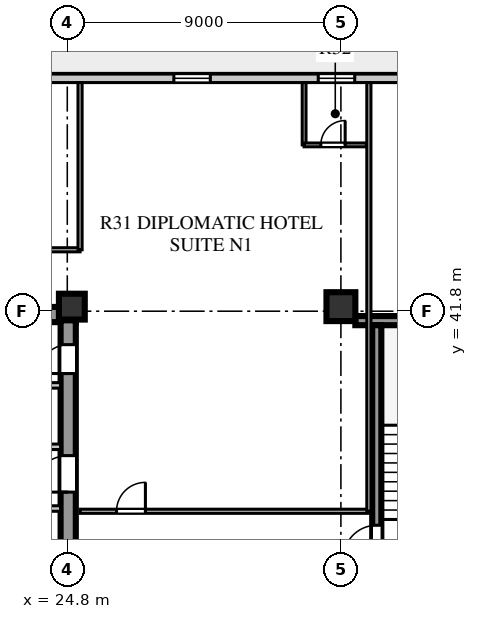
"""IFC4 building model, lengths in metres.
Left out: names, types, materials, properties, quantities, classifications, styles, units other than length and angle.
Written with IfcOpenShell. Run it as: python <this file> out.ifc"""

import sys

from ifc_helpers import new_model, si_unit, direction, frame, frame_2d, origin, origin_2d, place, context, subcontext, project, spatial, rectangle, extrude, element, fill, save


model = new_model("IFC4")
c1 = context("Model", 3, precision=1e-05, world=origin(), true_north=direction((0.0, 1.0)))
c2 = subcontext(c1, "Body", "Model", "MODEL_VIEW")
j1 = project(units=[si_unit("LENGTHUNIT", "METRE"), si_unit("PLANEANGLEUNIT", "RADIAN")], contexts=[c1])
p1 = place(None, origin())
s1 = spatial("IfcSite", under=j1, at=p1, CompositionType="ELEMENT")
p2 = place(p1, origin())
s2 = spatial("IfcBuilding", under=s1, at=p2, CompositionType="ELEMENT")
p3 = place(p2, frame((0.0, 0.0, 188.7)))
s3 = spatial("IfcBuildingStorey", under=s2, at=p3, CompositionType="ELEMENT", Elevation=188.7)
p4 = place(p3, frame((15.4, 41.69, 0.0), z_axis=(0.0, 0.0, 1.0), x_axis=(1.0, 0.0, 0.0)))
e1 = element("IfcWall", 1, at=p4, inside=s3, PredefinedType="SHEAR", context=c2, shape_type="SweptSolid", body=[
    extrude(rectangle(XDim=9.68, YDim=0.5, at=frame_2d((4.84, 0.0))), origin(), (0.0, 0.0, 1.0), 3.6),
])
p5 = place(p3, frame((24.83, 15.74, 0.0), z_axis=(0.0, 0.0, 1.0), x_axis=(0.0, 1.0, 0.0)))
e2 = element("IfcWall", 2, at=p5, inside=s3, PredefinedType="SHEAR", context=c2, shape_type="SweptSolid", body=[
    extrude(rectangle(XDim=25.76, YDim=0.5, at=frame_2d((12.88, 0.0))), origin(), (0.0, 0.0, 1.0), 3.6),
])
p6 = place(p5, frame((1.61, 0.0, 0.0)))
e3 = element("IfcOpeningElement", 3, at=p6, cuts=e2, PredefinedType="OPENING", context=c2, shape_type="SweptSolid", body=[
    extrude(rectangle(XDim=1.2, YDim=2.1, at=frame_2d((0.6, 1.05))), frame((0.0, 0.26, 0.0), z_axis=(0.0, -1.0, 0.0), x_axis=(1.0, 0.0, 0.0)), (0.0, 0.0, 1.0), 0.52),
])
p7 = place(p5, frame((6.78, 0.0, 0.0)))
e4 = element("IfcOpeningElement", 4, at=p7, cuts=e2, PredefinedType="OPENING", context=c2, shape_type="SweptSolid", body=[
    extrude(rectangle(XDim=0.85, YDim=2.06, at=frame_2d((0.425, 1.03))), frame((0.0, 0.26, 0.0), z_axis=(0.0, -1.0, 0.0), x_axis=(1.0, 0.0, 0.0)), (0.0, 0.0, 1.0), 0.52),
])
p8 = place(p5, frame((12.11, 0.0, 0.0)))
e5 = element("IfcOpeningElement", 5, at=p8, cuts=e2, PredefinedType="OPENING", context=c2, shape_type="SweptSolid", body=[
    extrude(rectangle(XDim=1.5, YDim=2.12, at=frame_2d((0.75, 1.06))), frame((0.0, 0.26, 0.0), z_axis=(0.0, -1.0, 0.0), x_axis=(1.0, 0.0, 0.0)), (0.0, 0.0, 1.0), 0.52),
])
p9 = place(p5, frame((20.11, 0.0, 0.0)))
e6 = element("IfcOpeningElement", 6, at=p9, cuts=e2, PredefinedType="OPENING", context=c2, shape_type="SweptSolid", body=[
    extrude(rectangle(XDim=1.2, YDim=2.12, at=frame_2d((0.6, 1.06))), frame((0.0, 0.26, 0.0), z_axis=(0.0, -1.0, 0.0), x_axis=(1.0, 0.0, 0.0)), (0.0, 0.0, 1.0), 0.52),
])
p10 = place(p5, frame((24.01, 0.0, 0.0)))
e7 = element("IfcOpeningElement", 7, at=p10, cuts=e2, PredefinedType="OPENING", context=c2, shape_type="SweptSolid", body=[
    extrude(rectangle(XDim=0.95, YDim=2.1, at=frame_2d((0.475, 1.05))), frame((0.0, 0.26, 0.0), z_axis=(0.0, -1.0, 0.0), x_axis=(1.0, 0.0, 0.0)), (0.0, 0.0, 1.0), 0.52),
])
p11 = place(p3, frame((34.275, 41.49, 0.0), z_axis=(0.0, 0.0, 1.0), x_axis=(1.0, 0.0, 0.0)))
e8 = element("IfcWall", 8, at=p11, inside=s3, PredefinedType="SHEAR", context=c2, shape_type="SweptSolid", body=[
    extrude(rectangle(XDim=4.595, YDim=0.3, at=frame_2d((2.298, 0.0))), origin(), (0.0, 0.0, 1.0), 3.6),
])
p12 = place(p3, frame((34.98, 33.31, 0.0), z_axis=(0.0, 0.0, 1.0), x_axis=(0.0, 1.0, 0.0)))
e9 = element("IfcWall", 9, at=p12, inside=s3, PredefinedType="SHEAR", context=c2, shape_type="SweptSolid", body=[
    extrude(rectangle(XDim=8.03, YDim=0.3, at=frame_2d((4.015, 0.0))), origin(), (0.0, 0.0, 1.0), 3.6),
])
p13 = place(p12, frame((0.35, 0.0, 0.0)))
e10 = element("IfcOpeningElement", 10, at=p13, cuts=e9, PredefinedType="OPENING", context=c2, shape_type="SweptSolid", body=[
    extrude(rectangle(XDim=1.1, YDim=2.1, at=frame_2d((0.55, 1.05))), frame((0.0, 0.16, 0.0), z_axis=(0.0, -1.0, 0.0), x_axis=(1.0, 0.0, 0.0)), (0.0, 0.0, 1.0), 0.32),
])
p14 = place(p3, frame((24.95, 41.95, 0.0), z_axis=(0.0, 0.0, 1.0), x_axis=(1.0, 0.0, 0.0)))
e11 = element("IfcColumn", 11, at=p14, inside=s3, PredefinedType="COLUMN", context=c2, shape_type="SweptSolid", body=[
    extrude(rectangle(XDim=0.85, YDim=0.85, at=origin_2d()), origin(), (0.0, 0.0, 1.0), 3.6),
])
p15 = place(p3, frame((33.8, 41.95, 0.0), z_axis=(0.0, 0.0, 1.0), x_axis=(1.0, 0.0, 0.0)))
e12 = element("IfcColumn", 12, at=p15, inside=s3, PredefinedType="COLUMN", context=c2, shape_type="SweptSolid", body=[
    extrude(rectangle(XDim=0.95, YDim=0.95, at=origin_2d()), origin(), (0.0, 0.0, 1.0), 3.6),
])
p16 = place(p3, frame((45.55, 49.46, 0.0), z_axis=(0.0, 0.0, 1.0), x_axis=(-1.0, 0.0, 0.0)))
e13 = element("IfcWall", 13, at=p16, inside=s3, PredefinedType="STANDARD", context=c2, shape_type="SweptSolid", body=[
    extrude(rectangle(XDim=32.5, YDim=0.28, at=frame_2d((16.25, 0.0))), origin(), (0.0, 0.0, 1.0), 3.6),
])
p17 = place(p16, frame((30.55, 0.0, 0.0)))
e14 = element("IfcOpeningElement", 14, at=p17, cuts=e13, PredefinedType="OPENING", context=c2, shape_type="SweptSolid", body=[
    extrude(rectangle(XDim=1.0, YDim=2.05, at=frame_2d((0.5, 1.025))), frame((0.0, 0.15, 0.0), z_axis=(0.0, -1.0, 0.0), x_axis=(1.0, 0.0, 0.0)), (0.0, 0.0, 1.0), 0.3),
])
p18 = place(p16, frame((24.72, 0.0, 0.8)))
e15 = element("IfcOpeningElement", 15, at=p18, cuts=e13, PredefinedType="OPENING", context=c2, shape_type="SweptSolid", body=[
    extrude(rectangle(XDim=1.5, YDim=2.0, at=frame_2d((0.75, 1.0))), frame((0.0, 0.15, 0.0), z_axis=(0.0, -1.0, 0.0), x_axis=(1.0, 0.0, 0.0)), (0.0, 0.0, 1.0), 0.3),
])
p19 = place(p16, frame((16.045, 0.0, 0.8)))
e16 = element("IfcOpeningElement", 16, at=p19, cuts=e13, PredefinedType="OPENING", context=c2, shape_type="SweptSolid", body=[
    extrude(rectangle(XDim=1.2, YDim=1.75, at=frame_2d((0.6, 0.875))), frame((0.0, 0.15, 0.0), z_axis=(0.0, -1.0, 0.0), x_axis=(1.0, 0.0, 0.0)), (0.0, 0.0, 1.0), 0.3),
])
p20 = place(p16, frame((11.295, 0.0, 0.8)))
e17 = element("IfcOpeningElement", 17, at=p20, cuts=e13, PredefinedType="OPENING", context=c2, shape_type="SweptSolid", body=[
    extrude(rectangle(XDim=1.2, YDim=1.75, at=frame_2d((0.6, 0.875))), frame((0.0, 0.15, 0.0), z_axis=(0.0, -1.0, 0.0), x_axis=(1.0, 0.0, 0.0)), (0.0, 0.0, 1.0), 0.3),
])
p21 = place(p16, frame((6.73, 0.0, 0.8)))
e18 = element("IfcOpeningElement", 18, at=p21, cuts=e13, PredefinedType="OPENING", context=c2, shape_type="SweptSolid", body=[
    extrude(rectangle(XDim=2.1, YDim=1.95, at=frame_2d((1.05, 0.975))), frame((0.0, 0.15, 0.0), z_axis=(0.0, -1.0, 0.0), x_axis=(1.0, 0.0, 0.0)), (0.0, 0.0, 1.0), 0.3),
])
p22 = place(p16, frame((1.745, 0.0, 0.8)))
e19 = element("IfcOpeningElement", 19, at=p22, cuts=e13, PredefinedType="OPENING", context=c2, shape_type="SweptSolid", body=[
    extrude(rectangle(XDim=1.35, YDim=1.9, at=frame_2d((0.675, 0.95))), frame((0.0, 0.15, 0.0), z_axis=(0.0, -1.0, 0.0), x_axis=(1.0, 0.0, 0.0)), (0.0, 0.0, 1.0), 0.3),
])
p23 = place(p3, frame((22.02, 35.31, 0.0), z_axis=(0.0, 0.0, 1.0), x_axis=(1.0, 0.0, 0.0)))
e20 = element("IfcWall", 20, at=p23, inside=s3, PredefinedType="SOLIDWALL", context=c2, shape_type="SweptSolid", body=[
    extrude(rectangle(XDim=2.56, YDim=0.18, at=frame_2d((1.28, 0.0))), origin(), (0.0, 0.0, 1.0), 3.6),
])
p24 = place(p23, frame((0.55, 0.0, 0.0)))
e21 = element("IfcOpeningElement", 21, at=p24, cuts=e20, PredefinedType="OPENING", context=c2, shape_type="SweptSolid", body=[
    extrude(rectangle(XDim=1.0, YDim=2.1, at=frame_2d((0.5, 1.05))), frame((0.0, 0.1, 0.0), z_axis=(0.0, -1.0, 0.0), x_axis=(1.0, 0.0, 0.0)), (0.0, 0.0, 1.0), 0.2),
])
p25 = place(p3, frame((19.64, 37.34, 0.0), z_axis=(0.0, 0.0, 1.0), x_axis=(1.0, 0.0, 0.0)))
e22 = element("IfcWall", 22, at=p25, inside=s3, PredefinedType="SOLIDWALL", context=c2, shape_type="SweptSolid", body=[
    extrude(rectangle(XDim=4.94, YDim=0.18, at=frame_2d((2.47, 0.0))), origin(), (0.0, 0.0, 1.0), 3.6),
])
p26 = place(p25, frame((0.45, 0.0, 0.0)))
e23 = element("IfcOpeningElement", 23, at=p26, cuts=e22, PredefinedType="OPENING", context=c2, shape_type="SweptSolid", body=[
    extrude(rectangle(XDim=1.0, YDim=2.1, at=frame_2d((0.5, 1.05))), frame((0.0, 0.1, 0.0), z_axis=(0.0, -1.0, 0.0), x_axis=(1.0, 0.0, 0.0)), (0.0, 0.0, 1.0), 0.2),
])
p27 = place(p25, frame((2.5, 0.0, 0.0)))
e24 = element("IfcOpeningElement", 24, at=p27, cuts=e22, PredefinedType="OPENING", context=c2, shape_type="SweptSolid", body=[
    extrude(rectangle(XDim=1.0, YDim=2.1, at=frame_2d((0.5, 1.05))), frame((0.0, 0.1, 0.0), z_axis=(0.0, -1.0, 0.0), x_axis=(1.0, 0.0, 0.0)), (0.0, 0.0, 1.0), 0.2),
])
p28 = place(p3, frame((19.64, 39.36, 0.0), z_axis=(0.0, 0.0, 1.0), x_axis=(1.0, 0.0, 0.0)))
e25 = element("IfcWall", 25, at=p28, inside=s3, PredefinedType="SOLIDWALL", context=c2, shape_type="SweptSolid", body=[
    extrude(rectangle(XDim=4.94, YDim=0.18, at=frame_2d((2.47, 0.0))), origin(), (0.0, 0.0, 1.0), 3.6),
])
p29 = place(p3, frame((25.22, 35.22, 0.0), z_axis=(0.0, 0.0, 1.0), x_axis=(1.0, 0.0, 0.0)))
e26 = element("IfcWall", 26, at=p29, inside=s3, PredefinedType="PARTITIONING", context=c2, shape_type="SweptSolid", body=[
    extrude(rectangle(XDim=9.5, YDim=0.135, at=frame_2d((4.75, 0.0))), origin(), (0.0, 0.0, 1.0), 3.6),
])
p30 = place(p29, frame((1.2, 0.0, 0.0)))
e27 = element("IfcOpeningElement", 27, at=p30, cuts=e26, PredefinedType="OPENING", context=c2, shape_type="SweptSolid", body=[
    extrude(rectangle(XDim=0.95, YDim=2.1, at=frame_2d((0.475, 1.05))), frame((0.0, 0.078, 0.0), z_axis=(0.0, -1.0, 0.0), x_axis=(1.0, 0.0, 0.0)), (0.0, 0.0, 1.0), 0.155),
])
p31 = place(p3, frame((13.39, 43.82, 0.0), z_axis=(0.0, 0.0, 1.0), x_axis=(1.0, 0.0, 0.0)))
e28 = element("IfcWall", 28, at=p31, inside=s3, PredefinedType="PARTITIONING", context=c2, shape_type="SweptSolid", body=[
    extrude(rectangle(XDim=11.83, YDim=0.135, at=frame_2d((5.915, 0.0))), origin(), (0.0, 0.0, 1.0), 3.6),
])
p32 = place(p31, frame((4.76, 0.0, 0.0)))
e29 = element("IfcOpeningElement", 29, at=p32, cuts=e28, PredefinedType="OPENING", context=c2, shape_type="SweptSolid", body=[
    extrude(rectangle(XDim=1.0, YDim=2.08, at=frame_2d((0.5, 1.04))), frame((0.0, 0.078, 0.0), z_axis=(0.0, -1.0, 0.0), x_axis=(1.0, 0.0, 0.0)), (0.0, 0.0, 1.0), 0.155),
])
p33 = place(p3, frame((25.22, 43.82, 0.0), z_axis=(0.0, 0.0, 1.0), x_axis=(0.0, 1.0, 0.0)))
e30 = element("IfcWall", 30, at=p33, inside=s3, PredefinedType="PARTITIONING", context=c2, shape_type="SweptSolid", body=[
    extrude(rectangle(XDim=5.5, YDim=0.135, at=frame_2d((2.75, 0.0))), origin(), (0.0, 0.0, 1.0), 3.15),
])
p34 = place(p3, frame((34.72, 35.22, 0.0), z_axis=(0.0, 0.0, 1.0), x_axis=(0.0, 1.0, 0.0)))
e31 = element("IfcWall", 31, at=p34, inside=s3, PredefinedType="PARTITIONING", context=c2, shape_type="SweptSolid", body=[
    extrude(rectangle(XDim=14.1, YDim=0.135, at=frame_2d((7.05, 0.0))), origin(), (0.0, 0.0, 1.0), 3.6),
])
p35 = place(p3, frame((32.59, 47.27, 0.0), z_axis=(0.0, 0.0, 1.0), x_axis=(0.0, 1.0, 0.0)))
e32 = element("IfcWall", 32, at=p35, inside=s3, PredefinedType="PLUMBINGWALL", context=c2, shape_type="SweptSolid", body=[
    extrude(rectangle(XDim=2.05, YDim=0.125, at=frame_2d((1.025, 0.0))), origin(), (0.0, 0.0, 1.0), 3.6),
])
p36 = place(p3, frame((32.59, 47.27, 0.0), z_axis=(0.0, 0.0, 1.0), x_axis=(1.0, 0.0, 0.0)))
e33 = element("IfcWall", 33, at=p36, inside=s3, PredefinedType="PLUMBINGWALL", context=c2, shape_type="SweptSolid", body=[
    extrude(rectangle(XDim=2.05, YDim=0.125, at=frame_2d((1.025, 0.0))), origin(), (0.0, 0.0, 1.0), 3.6),
])
p37 = place(p36, frame((0.55, 0.0, 0.0)))
e34 = element("IfcOpeningElement", 34, at=p37, cuts=e33, PredefinedType="OPENING", context=c2, shape_type="SweptSolid", body=[
    extrude(rectangle(XDim=0.8, YDim=2.05, at=frame_2d((0.4, 1.025))), frame((0.0, 0.073, 0.0), z_axis=(0.0, -1.0, 0.0), x_axis=(1.0, 0.0, 0.0)), (0.0, 0.0, 1.0), 0.145),
])
p38 = place(p19, origin())
e35 = element("IfcWindow", 35, at=p38, inside=s3, PartitioningType="SINGLE_PANEL", PredefinedType="WINDOW", context=c2, shape_type="SweptSolid", body=[
    extrude(rectangle(XDim=1.2, YDim=1.75, at=frame_2d((0.6, 0.875))), frame((0.0, 0.03, 0.0), z_axis=(0.0, -1.0, 0.0), x_axis=(1.0, 0.0, 0.0)), (0.0, 0.0, 1.0), 0.06),
])
fill(e16, e35)
p39 = place(p20, origin())
e36 = element("IfcWindow", 36, at=p39, inside=s3, PartitioningType="SINGLE_PANEL", PredefinedType="WINDOW", context=c2, shape_type="SweptSolid", body=[
    extrude(rectangle(XDim=1.2, YDim=1.75, at=frame_2d((0.6, 0.875))), frame((0.0, 0.03, 0.0), z_axis=(0.0, -1.0, 0.0), x_axis=(1.0, 0.0, 0.0)), (0.0, 0.0, 1.0), 0.06),
])
fill(e17, e36)
p40 = place(p9, frame((1.2, 0.0, 0.0), z_axis=(0.0, 0.0, 1.0), x_axis=(-1.0, 0.0, 0.0)))
e37 = element("IfcDoor", 37, at=p40, inside=s3, OperationType="SINGLE_SWING_RIGHT", PredefinedType="DOOR", context=c2, shape_type="SweptSolid", body=[
    extrude(rectangle(XDim=1.2, YDim=2.12, at=frame_2d((0.6, 1.06))), frame((0.0, 0.025, 0.0), z_axis=(0.0, -1.0, 0.0), x_axis=(1.0, 0.0, 0.0)), (0.0, 0.0, 1.0), 0.05),
])
fill(e6, e37)
p41 = place(p10, frame((0.95, 0.0, 0.0), z_axis=(0.0, 0.0, 1.0), x_axis=(-1.0, 0.0, 0.0)))
e38 = element("IfcDoor", 38, at=p41, inside=s3, OperationType="SINGLE_SWING_RIGHT", PredefinedType="DOOR", context=c2, shape_type="SweptSolid", body=[
    extrude(rectangle(XDim=0.95, YDim=2.1, at=frame_2d((0.475, 1.05))), frame((0.0, 0.025, 0.0), z_axis=(0.0, -1.0, 0.0), x_axis=(1.0, 0.0, 0.0)), (0.0, 0.0, 1.0), 0.05),
])
fill(e7, e38)
p42 = place(p13, origin())
e39 = element("IfcDoor", 39, at=p42, inside=s3, OperationType="SINGLE_SWING_LEFT", PredefinedType="DOOR", context=c2, shape_type="SweptSolid", body=[
    extrude(rectangle(XDim=1.1, YDim=2.1, at=frame_2d((0.55, 1.05))), frame((0.0, 0.025, 0.0), z_axis=(0.0, -1.0, 0.0), x_axis=(1.0, 0.0, 0.0)), (0.0, 0.0, 1.0), 0.05),
])
fill(e10, e39)
p43 = place(p30, origin())
e40 = element("IfcDoor", 40, at=p43, inside=s3, OperationType="SINGLE_SWING_RIGHT", PredefinedType="DOOR", context=c2, shape_type="SweptSolid", body=[
    extrude(rectangle(XDim=0.95, YDim=2.1, at=frame_2d((0.475, 1.05))), frame((0.0, 0.025, 0.0), z_axis=(0.0, -1.0, 0.0), x_axis=(1.0, 0.0, 0.0)), (0.0, 0.0, 1.0), 0.05),
])
fill(e27, e40)
p44 = place(p37, frame((0.8, 0.0, 0.0), z_axis=(0.0, 0.0, 1.0), x_axis=(-1.0, 0.0, 0.0)))
e41 = element("IfcDoor", 41, at=p44, inside=s3, OperationType="SINGLE_SWING_LEFT", PredefinedType="DOOR", context=c2, shape_type="SweptSolid", body=[
    extrude(rectangle(XDim=0.8, YDim=2.05, at=frame_2d((0.4, 1.025))), frame((0.0, 0.025, 0.0), z_axis=(0.0, -1.0, 0.0), x_axis=(1.0, 0.0, 0.0)), (0.0, 0.0, 1.0), 0.05),
])
fill(e34, e41)
save(model, sys.argv[1])
